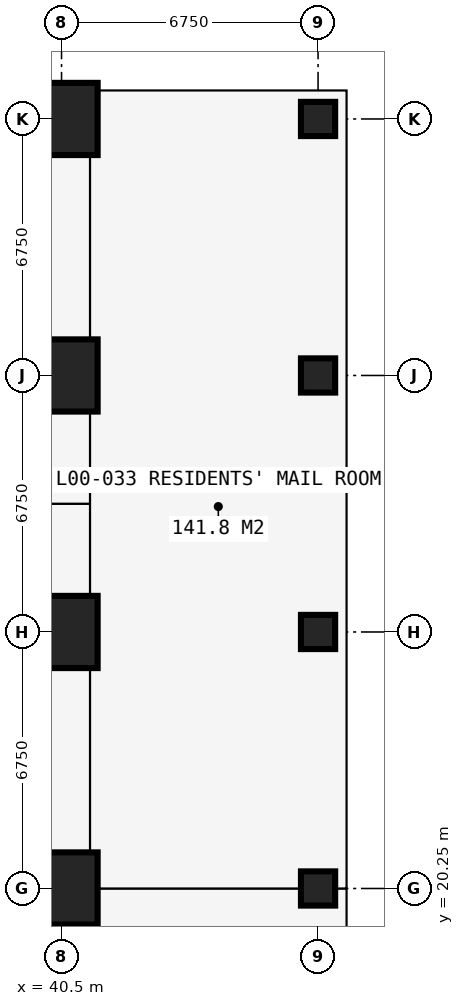
"""IFC4 building model, lengths in metres.
Left out: names, types, materials, properties, quantities, classifications, styles, units other than length and angle.
Written with IfcOpenShell. Run it as: python <this file> out.ifc"""

import sys

from ifc_helpers import new_model, si_unit, direction, frame, frame_2d, origin, origin_2d, place, context, subcontext, project, spatial, rectangle, circle, extrude, element, fill, save


model = new_model("IFC4")
c1 = context("Model", 3, precision=1e-05, world=origin(), true_north=direction((0.0, 1.0)))
c2 = subcontext(c1, "Body", "Model", "MODEL_VIEW")
j1 = project(units=[si_unit("LENGTHUNIT", "METRE"), si_unit("PLANEANGLEUNIT", "RADIAN")], contexts=[c1])
p1 = place(None, origin())
s1 = spatial("IfcSite", under=j1, at=p1, CompositionType="ELEMENT")
p2 = place(p1, origin())
s2 = spatial("IfcBuilding", under=s1, at=p2, CompositionType="ELEMENT")
p3 = place(p2, origin())
s3 = spatial("IfcBuildingStorey", under=s2, at=p3, CompositionType="ELEMENT", Elevation=0.0)
for number, where, z_axis, x_axis in (
    (1, (40.5, 20.25, 0.0), (0.0, 0.0, 1.0), (1.0, 0.0, 0.0)),
    (2, (40.5, 27.0, 0.0), (0.0, 0.0, 1.0), (1.0, 0.0, 0.0)),
    (3, (40.5, 33.75, 0.0), (0.0, 0.0, 1.0), (1.0, 0.0, 0.0)),
    (4, (40.5, 40.5, 0.0), (0.0, 0.0, 1.0), (1.0, 0.0, 0.0)),
):
    element("IfcColumn", number, at=place(p3, frame(where, z_axis=z_axis, x_axis=x_axis)), inside=s3, PredefinedType="COLUMN", context=c2, shape_type="SweptSolid", body=[
        extrude(rectangle(XDim=1.9, YDim=1.9, at=origin_2d()), origin(), (0.0, 0.0, 1.0), 4.5),
    ])
for number, where, z_axis, x_axis in (
    (5, (47.25, 20.25, 0.0), (0.0, 0.0, 1.0), (1.0, 0.0, 0.0)),
    (6, (47.25, 27.0, 0.0), (0.0, 0.0, 1.0), (1.0, 0.0, 0.0)),
    (7, (47.25, 33.75, 0.0), (0.0, 0.0, 1.0), (1.0, 0.0, 0.0)),
    (8, (47.25, 40.5, 0.0), (0.0, 0.0, 1.0), (1.0, 0.0, 0.0)),
):
    element("IfcColumn", number, at=place(p3, frame(where, z_axis=z_axis, x_axis=x_axis)), inside=s3, PredefinedType="COLUMN", context=c2, shape_type="SweptSolid", body=[
        extrude(circle(Radius=0.45, at=origin_2d()), origin(), (0.0, 0.0, 1.0), 4.5),
    ])
p4 = place(p3, frame((30.375, 30.375, 0.0), z_axis=(0.0, 0.0, 1.0), x_axis=(1.0, 0.0, 0.0)))
e9 = element("IfcWall", 9, at=p4, inside=s3, PredefinedType="PARTITIONING", context=c2, shape_type="SweptSolid", body=[
    extrude(rectangle(XDim=10.875, YDim=0.15, at=frame_2d((5.438, 0.0))), origin(), (0.0, 0.0, 1.0), 4.25),
])
p5 = place(p3, frame((41.25, -0.75, 0.0), z_axis=(0.0, 0.0, 1.0), x_axis=(0.0, 1.0, 0.0)))
e10 = element("IfcWall", 10, at=p5, inside=s3, PredefinedType="PARTITIONING", context=c2, shape_type="SweptSolid", body=[
    extrude(rectangle(XDim=41.984, YDim=0.15, at=frame_2d((20.992, 0.0))), origin(), (0.0, 0.0, 1.0), 4.25),
])
p6 = place(p5, frame((9.7, 0.0, 0.0)))
e11 = element("IfcOpeningElement", 11, at=p6, cuts=e10, PredefinedType="OPENING", context=c2, shape_type="SweptSolid", body=[
    extrude(rectangle(XDim=1.6, YDim=2.4, at=frame_2d((0.8, 1.2))), frame((0.0, 0.085, 0.0), z_axis=(0.0, -1.0, 0.0), x_axis=(1.0, 0.0, 0.0)), (0.0, 0.0, 1.0), 0.17),
])
p7 = place(p5, frame((25.15, 0.0, 0.0)))
e12 = element("IfcOpeningElement", 12, at=p7, cuts=e10, PredefinedType="OPENING", context=c2, shape_type="SweptSolid", body=[
    extrude(rectangle(XDim=1.6, YDim=2.4, at=frame_2d((0.8, 1.2))), frame((0.0, 0.085, 0.0), z_axis=(0.0, -1.0, 0.0), x_axis=(1.0, 0.0, 0.0)), (0.0, 0.0, 1.0), 0.17),
])
p8 = place(p3, frame((41.25, 20.25, 0.0), z_axis=(0.0, 0.0, 1.0), x_axis=(1.0, 0.0, 0.0)))
e13 = element("IfcWall", 13, at=p8, inside=s3, PredefinedType="PARTITIONING", context=c2, shape_type="SweptSolid", body=[
    extrude(rectangle(XDim=6.734, YDim=0.15, at=frame_2d((3.367, 0.0))), origin(), (0.0, 0.0, 1.0), 3.752),
])
p9 = place(p7, origin())
e14 = element("IfcDoor", 14, at=p9, inside=s3, OperationType="DOUBLE_DOOR_SINGLE_SWING", PredefinedType="DOOR", context=c2, shape_type="SweptSolid", body=[
    extrude(rectangle(XDim=1.6, YDim=2.4, at=frame_2d((0.8, 1.2))), frame((0.0, 0.025, 0.0), z_axis=(0.0, -1.0, 0.0), x_axis=(1.0, 0.0, 0.0)), (0.0, 0.0, 1.0), 0.05),
])
fill(e12, e14)
save(model, sys.argv[1])
